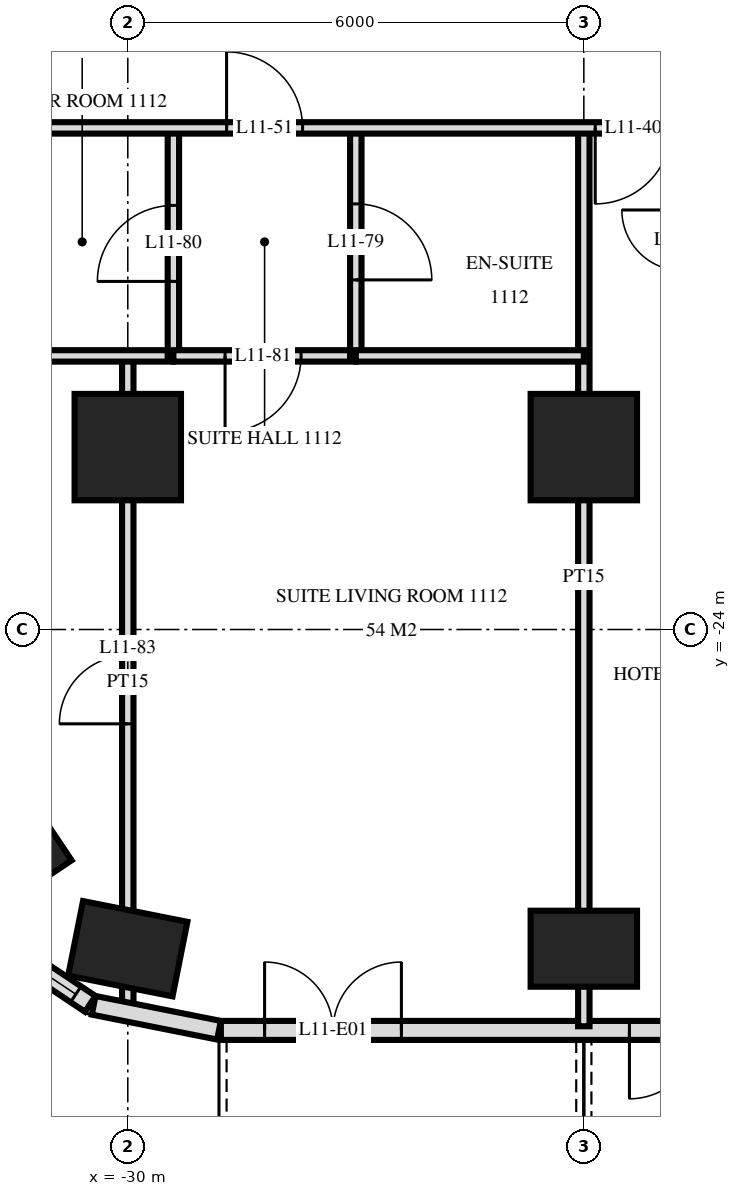
"""IFC4 building model, lengths in metres.
Left out: names, types, materials, properties, quantities, classifications, styles, units other than length and angle.
Written with IfcOpenShell. Run it as: python <this file> out.ifc"""

import sys

from ifc_helpers import new_model, si_unit, direction, frame, frame_2d, origin, origin_2d, place, context, subcontext, project, spatial, rectangle, extrude, element, fill, save


model = new_model("IFC4")
c1 = context("Model", 3, precision=1e-05, world=origin(), true_north=direction((0.0, 1.0)))
c2 = subcontext(c1, "Body", "Model", "MODEL_VIEW")
j1 = project(units=[si_unit("LENGTHUNIT", "METRE"), si_unit("PLANEANGLEUNIT", "RADIAN")], contexts=[c1])
p1 = place(None, origin())
s1 = spatial("IfcSite", under=j1, at=p1, CompositionType="ELEMENT")
p2 = place(p1, origin())
s2 = spatial("IfcBuilding", under=s1, at=p2, CompositionType="ELEMENT")
p3 = place(p2, frame((0.0, 0.0, 49.2)))
s3 = spatial("IfcBuildingStorey", under=s2, at=p3, CompositionType="ELEMENT", Elevation=49.2)
for number, where, z_axis, x_axis in (
    (1, (-31.544, -26.733, 0.0), (0.0, 0.0, 1.0), (-0.556, 0.831, 0.0)),
    (2, (-30.0, -28.2, 0.0), (0.0, 0.0, 1.0), (-0.981, 0.195, 0.0)),
):
    element("IfcColumn", number, at=place(p3, frame(where, z_axis=z_axis, x_axis=x_axis)), inside=s3, PredefinedType="COLUMN", context=c2, shape_type="SweptSolid", body=[
        extrude(rectangle(XDim=1.4, YDim=1.0, at=origin_2d()), origin(), (0.0, 0.0, 1.0), 3.6),
    ])
p4 = place(p3, frame((-30.0, -21.6, 0.0), z_axis=(0.0, 0.0, 1.0), x_axis=(1.0, 0.0, 0.0)))
e3 = element("IfcColumn", 3, at=p4, inside=s3, PredefinedType="COLUMN", context=c2, shape_type="SweptSolid", body=[
    extrude(rectangle(XDim=1.4, YDim=1.4, at=origin_2d()), origin(), (0.0, 0.0, 1.0), 3.6),
])
p5 = place(p3, frame((-24.0, -28.2, 0.0), z_axis=(0.0, 0.0, 1.0), x_axis=(1.0, 0.0, 0.0)))
e4 = element("IfcColumn", 4, at=p5, inside=s3, PredefinedType="COLUMN", context=c2, shape_type="SweptSolid", body=[
    extrude(rectangle(XDim=1.4, YDim=1.0, at=origin_2d()), origin(), (0.0, 0.0, 1.0), 3.6),
])
p6 = place(p3, frame((-24.0, -21.6, 0.0), z_axis=(0.0, 0.0, 1.0), x_axis=(1.0, 0.0, 0.0)))
e5 = element("IfcColumn", 5, at=p6, inside=s3, PredefinedType="COLUMN", context=c2, shape_type="SweptSolid", body=[
    extrude(rectangle(XDim=1.4, YDim=1.4, at=origin_2d()), origin(), (0.0, 0.0, 1.0), 3.6),
])
p7 = place(p3, frame((-31.871, -28.006, 0.0), z_axis=(0.0, 0.0, 1.0), x_axis=(0.831482937015, -0.55555029066, 0.0)))
e6 = element("IfcWall", 6, at=p7, inside=s3, PredefinedType="SOLIDWALL", context=c2, shape_type="SweptSolid", body=[
    extrude(rectangle(XDim=1.656, YDim=0.25, at=frame_2d((0.828, 0.0))), origin(), (0.0, 0.0, 1.0), 3.32),
])
p8 = place(p7, frame((0.228, 0.0, 0.9)))
e7 = element("IfcOpeningElement", 7, at=p8, cuts=e6, PredefinedType="OPENING", context=c2, shape_type="SweptSolid", body=[
    extrude(rectangle(XDim=1.2, YDim=1.5, at=frame_2d((0.6, 0.75))), frame((0.0, 0.135, 0.0), z_axis=(0.0, -1.0, 0.0), x_axis=(1.0, 0.0, 0.0)), (0.0, 0.0, 1.0), 0.27),
])
p9 = place(p3, frame((-30.449, -28.945, 0.0), z_axis=(0.0, 0.0, 1.0), x_axis=(0.980775640221, -0.19513878023, 0.0)))
e8 = element("IfcWall", 8, at=p9, inside=s3, PredefinedType="SOLIDWALL", context=c2, shape_type="SweptSolid", body=[
    extrude(rectangle(XDim=1.681, YDim=0.25, at=frame_2d((0.841, 0.0))), origin(), (0.0, 0.0, 1.0), 3.32),
])
p10 = place(p3, frame((-28.775, -29.275, 0.0), z_axis=(0.0, 0.0, 1.0), x_axis=(1.0, 0.0, 0.0)))
e9 = element("IfcWall", 9, at=p10, inside=s3, PredefinedType="SOLIDWALL", context=c2, shape_type="SweptSolid", body=[
    extrude(rectangle(XDim=57.551, YDim=0.25, at=frame_2d((28.775, 0.0))), origin(), (0.0, 0.0, 1.0), 3.32),
])
p11 = place(p10, frame((0.575, 0.0, 0.0)))
e10 = element("IfcOpeningElement", 10, at=p11, cuts=e9, PredefinedType="OPENING", context=c2, shape_type="SweptSolid", body=[
    extrude(rectangle(XDim=1.8, YDim=2.4, at=frame_2d((0.9, 1.2))), frame((0.0, 0.135, 0.0), z_axis=(0.0, -1.0, 0.0), x_axis=(1.0, 0.0, 0.0)), (0.0, 0.0, 1.0), 0.27),
])
p12 = place(p10, frame((5.375, 0.0, 0.0)))
e11 = element("IfcOpeningElement", 11, at=p12, cuts=e9, PredefinedType="OPENING", context=c2, shape_type="SweptSolid", body=[
    extrude(rectangle(XDim=1.8, YDim=2.4, at=frame_2d((0.9, 1.2))), frame((0.0, 0.135, 0.0), z_axis=(0.0, -1.0, 0.0), x_axis=(1.0, 0.0, 0.0)), (0.0, 0.0, 1.0), 0.27),
])
p13 = place(p10, frame((8.075, 0.0, 0.3)))
e12 = element("IfcOpeningElement", 12, at=p13, cuts=e9, PredefinedType="OPENING", context=c2, shape_type="SweptSolid", body=[
    extrude(rectangle(XDim=2.4, YDim=2.1, at=frame_2d((1.2, 1.05))), frame((0.0, 0.135, 0.0), z_axis=(0.0, -1.0, 0.0), x_axis=(1.0, 0.0, 0.0)), (0.0, 0.0, 1.0), 0.27),
])
p14 = place(p10, frame((11.375, 0.0, 0.0)))
e13 = element("IfcOpeningElement", 13, at=p14, cuts=e9, PredefinedType="OPENING", context=c2, shape_type="SweptSolid", body=[
    extrude(rectangle(XDim=1.8, YDim=2.4, at=frame_2d((0.9, 1.2))), frame((0.0, 0.135, 0.0), z_axis=(0.0, -1.0, 0.0), x_axis=(1.0, 0.0, 0.0)), (0.0, 0.0, 1.0), 0.27),
])
p15 = place(p10, frame((14.075, 0.0, 0.3)))
e14 = element("IfcOpeningElement", 14, at=p15, cuts=e9, PredefinedType="OPENING", context=c2, shape_type="SweptSolid", body=[
    extrude(rectangle(XDim=2.4, YDim=2.1, at=frame_2d((1.2, 1.05))), frame((0.0, 0.135, 0.0), z_axis=(0.0, -1.0, 0.0), x_axis=(1.0, 0.0, 0.0)), (0.0, 0.0, 1.0), 0.27),
])
p16 = place(p10, frame((17.375, 0.0, 0.0)))
e15 = element("IfcOpeningElement", 15, at=p16, cuts=e9, PredefinedType="OPENING", context=c2, shape_type="SweptSolid", body=[
    extrude(rectangle(XDim=1.8, YDim=2.4, at=frame_2d((0.9, 1.2))), frame((0.0, 0.135, 0.0), z_axis=(0.0, -1.0, 0.0), x_axis=(1.0, 0.0, 0.0)), (0.0, 0.0, 1.0), 0.27),
])
p17 = place(p10, frame((20.075, 0.0, 0.3)))
e16 = element("IfcOpeningElement", 16, at=p17, cuts=e9, PredefinedType="OPENING", context=c2, shape_type="SweptSolid", body=[
    extrude(rectangle(XDim=2.4, YDim=2.1, at=frame_2d((1.2, 1.05))), frame((0.0, 0.135, 0.0), z_axis=(0.0, -1.0, 0.0), x_axis=(1.0, 0.0, 0.0)), (0.0, 0.0, 1.0), 0.27),
])
p18 = place(p10, frame((23.075, 0.0, 0.3)))
e17 = element("IfcOpeningElement", 17, at=p18, cuts=e9, PredefinedType="OPENING", context=c2, shape_type="SweptSolid", body=[
    extrude(rectangle(XDim=2.4, YDim=2.1, at=frame_2d((1.2, 1.05))), frame((0.0, 0.135, 0.0), z_axis=(0.0, -1.0, 0.0), x_axis=(1.0, 0.0, 0.0)), (0.0, 0.0, 1.0), 0.27),
])
p19 = place(p10, frame((26.375, 0.0, 0.0)))
e18 = element("IfcOpeningElement", 18, at=p19, cuts=e9, PredefinedType="OPENING", context=c2, shape_type="SweptSolid", body=[
    extrude(rectangle(XDim=1.8, YDim=2.4, at=frame_2d((0.9, 1.2))), frame((0.0, 0.135, 0.0), z_axis=(0.0, -1.0, 0.0), x_axis=(1.0, 0.0, 0.0)), (0.0, 0.0, 1.0), 0.27),
])
p20 = place(p10, frame((29.375, 0.0, 0.0)))
e19 = element("IfcOpeningElement", 19, at=p20, cuts=e9, PredefinedType="OPENING", context=c2, shape_type="SweptSolid", body=[
    extrude(rectangle(XDim=1.8, YDim=2.4, at=frame_2d((0.9, 1.2))), frame((0.0, 0.135, 0.0), z_axis=(0.0, -1.0, 0.0), x_axis=(1.0, 0.0, 0.0)), (0.0, 0.0, 1.0), 0.27),
])
p21 = place(p10, frame((32.075, 0.0, 0.3)))
e20 = element("IfcOpeningElement", 20, at=p21, cuts=e9, PredefinedType="OPENING", context=c2, shape_type="SweptSolid", body=[
    extrude(rectangle(XDim=2.4, YDim=2.1, at=frame_2d((1.2, 1.05))), frame((0.0, 0.135, 0.0), z_axis=(0.0, -1.0, 0.0), x_axis=(1.0, 0.0, 0.0)), (0.0, 0.0, 1.0), 0.27),
])
p22 = place(p10, frame((35.075, 0.0, 0.3)))
e21 = element("IfcOpeningElement", 21, at=p22, cuts=e9, PredefinedType="OPENING", context=c2, shape_type="SweptSolid", body=[
    extrude(rectangle(XDim=2.4, YDim=2.1, at=frame_2d((1.2, 1.05))), frame((0.0, 0.135, 0.0), z_axis=(0.0, -1.0, 0.0), x_axis=(1.0, 0.0, 0.0)), (0.0, 0.0, 1.0), 0.27),
])
p23 = place(p10, frame((38.375, 0.0, 0.0)))
e22 = element("IfcOpeningElement", 22, at=p23, cuts=e9, PredefinedType="OPENING", context=c2, shape_type="SweptSolid", body=[
    extrude(rectangle(XDim=1.8, YDim=2.4, at=frame_2d((0.9, 1.2))), frame((0.0, 0.135, 0.0), z_axis=(0.0, -1.0, 0.0), x_axis=(1.0, 0.0, 0.0)), (0.0, 0.0, 1.0), 0.27),
])
p24 = place(p10, frame((41.375, 0.0, 0.0)))
e23 = element("IfcOpeningElement", 23, at=p24, cuts=e9, PredefinedType="OPENING", context=c2, shape_type="SweptSolid", body=[
    extrude(rectangle(XDim=1.8, YDim=2.4, at=frame_2d((0.9, 1.2))), frame((0.0, 0.135, 0.0), z_axis=(0.0, -1.0, 0.0), x_axis=(1.0, 0.0, 0.0)), (0.0, 0.0, 1.0), 0.27),
])
p25 = place(p10, frame((44.075, 0.0, 0.3)))
e24 = element("IfcOpeningElement", 24, at=p25, cuts=e9, PredefinedType="OPENING", context=c2, shape_type="SweptSolid", body=[
    extrude(rectangle(XDim=2.4, YDim=2.1, at=frame_2d((1.2, 1.05))), frame((0.0, 0.135, 0.0), z_axis=(0.0, -1.0, 0.0), x_axis=(1.0, 0.0, 0.0)), (0.0, 0.0, 1.0), 0.27),
])
p26 = place(p10, frame((47.075, 0.0, 0.3)))
e25 = element("IfcOpeningElement", 25, at=p26, cuts=e9, PredefinedType="OPENING", context=c2, shape_type="SweptSolid", body=[
    extrude(rectangle(XDim=2.4, YDim=2.1, at=frame_2d((1.2, 1.05))), frame((0.0, 0.135, 0.0), z_axis=(0.0, -1.0, 0.0), x_axis=(1.0, 0.0, 0.0)), (0.0, 0.0, 1.0), 0.27),
])
p27 = place(p10, frame((50.375, 0.0, 0.0)))
e26 = element("IfcOpeningElement", 26, at=p27, cuts=e9, PredefinedType="OPENING", context=c2, shape_type="SweptSolid", body=[
    extrude(rectangle(XDim=1.8, YDim=2.4, at=frame_2d((0.9, 1.2))), frame((0.0, 0.135, 0.0), z_axis=(0.0, -1.0, 0.0), x_axis=(1.0, 0.0, 0.0)), (0.0, 0.0, 1.0), 0.27),
])
p28 = place(p10, frame((53.375, 0.0, 0.0)))
e27 = element("IfcOpeningElement", 27, at=p28, cuts=e9, PredefinedType="OPENING", context=c2, shape_type="SweptSolid", body=[
    extrude(rectangle(XDim=1.8, YDim=2.4, at=frame_2d((0.9, 1.2))), frame((0.0, 0.135, 0.0), z_axis=(0.0, -1.0, 0.0), x_axis=(1.0, 0.0, 0.0)), (0.0, 0.0, 1.0), 0.27),
])
p29 = place(p3, frame((-24.0, -29.22, 0.0), z_axis=(0.0, 0.0, 1.0), x_axis=(0.0, 1.0, 0.0)))
e28 = element("IfcWall", 28, at=p29, inside=s3, PredefinedType="PARTITIONING", context=c2, shape_type="SweptSolid", body=[
    extrude(rectangle(XDim=11.82, YDim=0.15, at=frame_2d((5.91, 0.0))), origin(), (0.0, 0.0, 1.0), 3.32),
])
p30 = place(p3, frame((-27.0, -20.4, 0.0), z_axis=(0.0, 0.0, 1.0), x_axis=(0.0, 1.0, 0.0)))
e29 = element("IfcWall", 29, at=p30, inside=s3, PredefinedType="PARTITIONING", context=c2, shape_type="SweptSolid", body=[
    extrude(rectangle(XDim=3.0, YDim=0.15, at=frame_2d((1.5, 0.0))), origin(), (0.0, 0.0, 1.0), 3.32),
])
p31 = place(p30, frame((1.0, 0.0, 0.0)))
e30 = element("IfcOpeningElement", 30, at=p31, cuts=e29, PredefinedType="OPENING", context=c2, shape_type="SweptSolid", body=[
    extrude(rectangle(XDim=1.0, YDim=2.1, at=frame_2d((0.5, 1.05))), frame((0.0, 0.085, 0.0), z_axis=(0.0, -1.0, 0.0), x_axis=(1.0, 0.0, 0.0)), (0.0, 0.0, 1.0), 0.17),
])
p32 = place(p3, frame((-29.4, -20.4, 0.0), z_axis=(0.0, 0.0, 1.0), x_axis=(0.0, 1.0, 0.0)))
e31 = element("IfcWall", 31, at=p32, inside=s3, PredefinedType="PARTITIONING", context=c2, shape_type="SweptSolid", body=[
    extrude(rectangle(XDim=3.0, YDim=0.15, at=frame_2d((1.5, 0.0))), origin(), (0.0, 0.0, 1.0), 3.32),
])
p33 = place(p32, frame((0.98, 0.0, 0.0)))
e32 = element("IfcOpeningElement", 32, at=p33, cuts=e31, PredefinedType="OPENING", context=c2, shape_type="SweptSolid", body=[
    extrude(rectangle(XDim=1.0, YDim=2.1, at=frame_2d((0.5, 1.05))), frame((0.0, 0.085, 0.0), z_axis=(0.0, -1.0, 0.0), x_axis=(1.0, 0.0, 0.0)), (0.0, 0.0, 1.0), 0.17),
])
p34 = place(p3, frame((-30.0, -28.978, 0.0), z_axis=(0.0, 0.0, 1.0), x_axis=(0.0, 1.0, 0.0)))
e33 = element("IfcWall", 33, at=p34, inside=s3, PredefinedType="PARTITIONING", context=c2, shape_type="SweptSolid", body=[
    extrude(rectangle(XDim=8.578, YDim=0.15, at=frame_2d((4.289, 0.0))), origin(), (0.0, 0.0, 1.0), 3.32),
])
p35 = place(p34, frame((3.737, 0.0, 0.0)))
e34 = element("IfcOpeningElement", 34, at=p35, cuts=e33, PredefinedType="OPENING", context=c2, shape_type="SweptSolid", body=[
    extrude(rectangle(XDim=0.9, YDim=2.1, at=frame_2d((0.45, 1.05))), frame((0.0, 0.085, 0.0), z_axis=(0.0, -1.0, 0.0), x_axis=(1.0, 0.0, 0.0)), (0.0, 0.0, 1.0), 0.17),
])
p36 = place(p3, frame((-29.4, -20.4, 0.0), z_axis=(0.0, 0.0, 1.0), x_axis=(1.0, 0.0, 0.0)))
e35 = element("IfcWall", 35, at=p36, inside=s3, PredefinedType="PARTITIONING", context=c2, shape_type="SweptSolid", body=[
    extrude(rectangle(XDim=2.4, YDim=0.15, at=frame_2d((1.2, 0.0))), origin(), (0.0, 0.0, 1.0), 3.32),
])
p37 = place(p36, frame((0.68, 0.0, 0.0)))
e36 = element("IfcOpeningElement", 36, at=p37, cuts=e35, PredefinedType="OPENING", context=c2, shape_type="SweptSolid", body=[
    extrude(rectangle(XDim=1.0, YDim=2.1, at=frame_2d((0.5, 1.05))), frame((0.0, 0.085, 0.0), z_axis=(0.0, -1.0, 0.0), x_axis=(1.0, 0.0, 0.0)), (0.0, 0.0, 1.0), 0.17),
])
p38 = place(p3, frame((-31.8, -20.4, 0.0), z_axis=(0.0, 0.0, 1.0), x_axis=(1.0, 0.0, 0.0)))
e37 = element("IfcWall", 37, at=p38, inside=s3, PredefinedType="PARTITIONING", context=c2, shape_type="SweptSolid", body=[
    extrude(rectangle(XDim=2.4, YDim=0.15, at=frame_2d((1.2, 0.0))), origin(), (0.0, 0.0, 1.0), 3.32),
])
p39 = place(p3, frame((-27.0, -20.4, 0.0), z_axis=(0.0, 0.0, 1.0), x_axis=(1.0, 0.0, 0.0)))
e38 = element("IfcWall", 38, at=p39, inside=s3, PredefinedType="PARTITIONING", context=c2, shape_type="SweptSolid", body=[
    extrude(rectangle(XDim=3.0, YDim=0.15, at=frame_2d((1.5, 0.0))), origin(), (0.0, 0.0, 1.0), 3.32),
])
p40 = place(p3, frame((-33.12, -17.4, 0.0), z_axis=(0.0, 0.0, 1.0), x_axis=(1.0, 0.0, 0.0)))
e39 = element("IfcWall", 39, at=p40, inside=s3, PredefinedType="PARTITIONING", context=c2, shape_type="SweptSolid", body=[
    extrude(rectangle(XDim=66.24, YDim=0.15, at=frame_2d((33.12, 0.0))), origin(), (0.0, 0.0, 1.0), 3.32),
])
p41 = place(p40, frame((9.27, 0.0, 0.0)))
e40 = element("IfcOpeningElement", 40, at=p41, cuts=e39, PredefinedType="OPENING", context=c2, shape_type="SweptSolid", body=[
    extrude(rectangle(XDim=1.0, YDim=2.1, at=frame_2d((0.5, 1.05))), frame((0.0, 0.085, 0.0), z_axis=(0.0, -1.0, 0.0), x_axis=(1.0, 0.0, 0.0)), (0.0, 0.0, 1.0), 0.17),
])
p42 = place(p40, frame((13.97, 0.0, 0.0)))
e41 = element("IfcOpeningElement", 41, at=p42, cuts=e39, PredefinedType="OPENING", context=c2, shape_type="SweptSolid", body=[
    extrude(rectangle(XDim=1.0, YDim=2.1, at=frame_2d((0.5, 1.05))), frame((0.0, 0.085, 0.0), z_axis=(0.0, -1.0, 0.0), x_axis=(1.0, 0.0, 0.0)), (0.0, 0.0, 1.0), 0.17),
])
p43 = place(p40, frame((15.27, 0.0, 0.0)))
e42 = element("IfcOpeningElement", 42, at=p43, cuts=e39, PredefinedType="OPENING", context=c2, shape_type="SweptSolid", body=[
    extrude(rectangle(XDim=1.0, YDim=2.1, at=frame_2d((0.5, 1.05))), frame((0.0, 0.085, 0.0), z_axis=(0.0, -1.0, 0.0), x_axis=(1.0, 0.0, 0.0)), (0.0, 0.0, 1.0), 0.17),
])
p44 = place(p40, frame((19.97, 0.0, 0.0)))
e43 = element("IfcOpeningElement", 43, at=p44, cuts=e39, PredefinedType="OPENING", context=c2, shape_type="SweptSolid", body=[
    extrude(rectangle(XDim=1.0, YDim=2.1, at=frame_2d((0.5, 1.05))), frame((0.0, 0.085, 0.0), z_axis=(0.0, -1.0, 0.0), x_axis=(1.0, 0.0, 0.0)), (0.0, 0.0, 1.0), 0.17),
])
p45 = place(p40, frame((22.27, 0.0, 0.0)))
e44 = element("IfcOpeningElement", 44, at=p45, cuts=e39, PredefinedType="OPENING", context=c2, shape_type="SweptSolid", body=[
    extrude(rectangle(XDim=1.0, YDim=2.1, at=frame_2d((0.5, 1.05))), frame((0.0, 0.085, 0.0), z_axis=(0.0, -1.0, 0.0), x_axis=(1.0, 0.0, 0.0)), (0.0, 0.0, 1.0), 0.17),
])
p46 = place(p40, frame((28.97, 0.0, 0.0)))
e45 = element("IfcOpeningElement", 45, at=p46, cuts=e39, PredefinedType="OPENING", context=c2, shape_type="SweptSolid", body=[
    extrude(rectangle(XDim=1.0, YDim=2.1, at=frame_2d((0.5, 1.05))), frame((0.0, 0.085, 0.0), z_axis=(0.0, -1.0, 0.0), x_axis=(1.0, 0.0, 0.0)), (0.0, 0.0, 1.0), 0.17),
])
p47 = place(p40, frame((30.27, 0.0, 0.0)))
e46 = element("IfcOpeningElement", 46, at=p47, cuts=e39, PredefinedType="OPENING", context=c2, shape_type="SweptSolid", body=[
    extrude(rectangle(XDim=1.0, YDim=2.1, at=frame_2d((0.5, 1.05))), frame((0.0, 0.085, 0.0), z_axis=(0.0, -1.0, 0.0), x_axis=(1.0, 0.0, 0.0)), (0.0, 0.0, 1.0), 0.17),
])
p48 = place(p40, frame((34.97, 0.0, 0.0)))
e47 = element("IfcOpeningElement", 47, at=p48, cuts=e39, PredefinedType="OPENING", context=c2, shape_type="SweptSolid", body=[
    extrude(rectangle(XDim=1.0, YDim=2.1, at=frame_2d((0.5, 1.05))), frame((0.0, 0.085, 0.0), z_axis=(0.0, -1.0, 0.0), x_axis=(1.0, 0.0, 0.0)), (0.0, 0.0, 1.0), 0.17),
])
p49 = place(p40, frame((36.27, 0.0, 0.0)))
e48 = element("IfcOpeningElement", 48, at=p49, cuts=e39, PredefinedType="OPENING", context=c2, shape_type="SweptSolid", body=[
    extrude(rectangle(XDim=1.0, YDim=2.1, at=frame_2d((0.5, 1.05))), frame((0.0, 0.085, 0.0), z_axis=(0.0, -1.0, 0.0), x_axis=(1.0, 0.0, 0.0)), (0.0, 0.0, 1.0), 0.17),
])
p50 = place(p40, frame((39.82, 0.0, 0.0)))
e49 = element("IfcOpeningElement", 49, at=p50, cuts=e39, PredefinedType="OPENING", context=c2, shape_type="SweptSolid", body=[
    extrude(rectangle(XDim=1.0, YDim=2.1, at=frame_2d((0.5, 1.05))), frame((0.0, 0.085, 0.0), z_axis=(0.0, -1.0, 0.0), x_axis=(1.0, 0.0, 0.0)), (0.0, 0.0, 1.0), 0.17),
])
p51 = place(p40, frame((51.27, 0.0, 0.0)))
e50 = element("IfcOpeningElement", 50, at=p51, cuts=e39, PredefinedType="OPENING", context=c2, shape_type="SweptSolid", body=[
    extrude(rectangle(XDim=1.0, YDim=2.1, at=frame_2d((0.5, 1.05))), frame((0.0, 0.085, 0.0), z_axis=(0.0, -1.0, 0.0), x_axis=(1.0, 0.0, 0.0)), (0.0, 0.0, 1.0), 0.17),
])
p52 = place(p40, frame((4.42, 0.0, 0.0)))
e51 = element("IfcOpeningElement", 51, at=p52, cuts=e39, PredefinedType="OPENING", context=c2, shape_type="SweptSolid", body=[
    extrude(rectangle(XDim=1.0, YDim=2.1, at=frame_2d((0.5, 1.05))), frame((0.0, 0.085, 0.0), z_axis=(0.0, -1.0, 0.0), x_axis=(1.0, 0.0, 0.0)), (0.0, 0.0, 1.0), 0.17),
])
p53 = place(p40, frame((54.82, 0.0, 0.0)))
e52 = element("IfcOpeningElement", 52, at=p53, cuts=e39, PredefinedType="OPENING", context=c2, shape_type="SweptSolid", body=[
    extrude(rectangle(XDim=1.0, YDim=2.1, at=frame_2d((0.5, 1.05))), frame((0.0, 0.085, 0.0), z_axis=(0.0, -1.0, 0.0), x_axis=(1.0, 0.0, 0.0)), (0.0, 0.0, 1.0), 0.17),
])
p54 = place(p8, origin())
e53 = element("IfcWindow", 53, at=p54, inside=s3, PartitioningType="SINGLE_PANEL", PredefinedType="WINDOW", context=c2, shape_type="SweptSolid", body=[
    extrude(rectangle(XDim=1.2, YDim=1.5, at=frame_2d((0.6, 0.75))), frame((0.0, 0.03, 0.0), z_axis=(0.0, -1.0, 0.0), x_axis=(1.0, 0.0, 0.0)), (0.0, 0.0, 1.0), 0.06),
])
fill(e7, e53)
p55 = place(p11, origin())
e54 = element("IfcDoor", 54, at=p55, inside=s3, OperationType="DOUBLE_DOOR_SINGLE_SWING", PredefinedType="DOOR", context=c2, shape_type="SweptSolid", body=[
    extrude(rectangle(XDim=1.8, YDim=2.4, at=frame_2d((0.9, 1.2))), frame((0.0, 0.025, 0.0), z_axis=(0.0, -1.0, 0.0), x_axis=(1.0, 0.0, 0.0)), (0.0, 0.0, 1.0), 0.05),
])
fill(e10, e54)
p56 = place(p12, frame((0.9, 0.0, 0.0), z_axis=(0.0, 0.0, 1.0), x_axis=(-1.0, 0.0, 0.0)))
e55 = element("IfcDoor", 55, at=p56, inside=s3, OperationType="DOUBLE_DOOR_SINGLE_SWING", PredefinedType="DOOR", context=c2, shape_type="SweptSolid", body=[
    extrude(rectangle(XDim=1.8, YDim=2.4, at=frame_2d((0.0, 1.2))), frame((0.0, -0.025, 0.0), z_axis=(0.0, 1.0, 0.0), x_axis=(-1.0, 0.0, 0.0)), (0.0, 0.0, 1.0), 0.05),
])
fill(e11, e55)
p57 = place(p41, frame((0.5, 0.0, 0.0), z_axis=(0.0, 0.0, 1.0), x_axis=(-1.0, 0.0, 0.0)))
e56 = element("IfcDoor", 56, at=p57, inside=s3, OperationType="SINGLE_SWING_LEFT", PredefinedType="DOOR", context=c2, shape_type="SweptSolid", body=[
    extrude(rectangle(XDim=1.0, YDim=2.1, at=frame_2d((0.0, 1.05))), frame((0.0, -0.025, 0.0), z_axis=(0.0, 1.0, 0.0), x_axis=(-1.0, 0.0, 0.0)), (0.0, 0.0, 1.0), 0.05),
])
fill(e40, e56)
p58 = place(p52, origin())
e57 = element("IfcDoor", 57, at=p58, inside=s3, OperationType="SINGLE_SWING_RIGHT", PredefinedType="DOOR", context=c2, shape_type="SweptSolid", body=[
    extrude(rectangle(XDim=1.0, YDim=2.1, at=frame_2d((0.5, 1.05))), frame((0.0, 0.025, 0.0), z_axis=(0.0, -1.0, 0.0), x_axis=(1.0, 0.0, 0.0)), (0.0, 0.0, 1.0), 0.05),
])
fill(e51, e57)
p59 = place(p31, frame((0.5, 0.0, 0.0), z_axis=(0.0, 0.0, 1.0), x_axis=(-1.0, 0.0, 0.0)))
e58 = element("IfcDoor", 58, at=p59, inside=s3, OperationType="SINGLE_SWING_LEFT", PredefinedType="DOOR", context=c2, shape_type="SweptSolid", body=[
    extrude(rectangle(XDim=1.0, YDim=2.1, at=frame_2d((0.0, 1.05))), frame((0.0, -0.025, 0.0), z_axis=(0.0, 1.0, 0.0), x_axis=(-1.0, 0.0, 0.0)), (0.0, 0.0, 1.0), 0.05),
])
fill(e30, e58)
p60 = place(p33, origin())
e59 = element("IfcDoor", 59, at=p60, inside=s3, OperationType="SINGLE_SWING_RIGHT", PredefinedType="DOOR", context=c2, shape_type="SweptSolid", body=[
    extrude(rectangle(XDim=1.0, YDim=2.1, at=frame_2d((0.5, 1.05))), frame((0.0, 0.025, 0.0), z_axis=(0.0, -1.0, 0.0), x_axis=(1.0, 0.0, 0.0)), (0.0, 0.0, 1.0), 0.05),
])
fill(e32, e59)
p61 = place(p37, frame((0.5, 0.0, 0.0), z_axis=(0.0, 0.0, 1.0), x_axis=(-1.0, 0.0, 0.0)))
e60 = element("IfcDoor", 60, at=p61, inside=s3, OperationType="SINGLE_SWING_LEFT", PredefinedType="DOOR", context=c2, shape_type="SweptSolid", body=[
    extrude(rectangle(XDim=1.0, YDim=2.1, at=frame_2d((0.0, 1.05))), frame((0.0, -0.025, 0.0), z_axis=(0.0, 1.0, 0.0), x_axis=(-1.0, 0.0, 0.0)), (0.0, 0.0, 1.0), 0.05),
])
fill(e36, e60)
p62 = place(p35, origin())
e61 = element("IfcDoor", 61, at=p62, inside=s3, OperationType="SINGLE_SWING_RIGHT", PredefinedType="DOOR", context=c2, shape_type="SweptSolid", body=[
    extrude(rectangle(XDim=0.9, YDim=2.1, at=frame_2d((0.45, 1.05))), frame((0.0, 0.025, 0.0), z_axis=(0.0, -1.0, 0.0), x_axis=(1.0, 0.0, 0.0)), (0.0, 0.0, 1.0), 0.05),
])
fill(e34, e61)
save(model, sys.argv[1])
